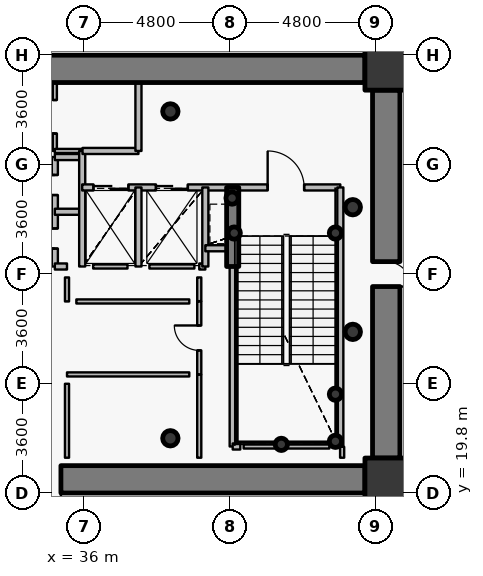
"""IFC4 building model, lengths in metres.
Left out: names, types, materials, properties, quantities, classifications, styles, units other than length and angle.
Written with IfcOpenShell. Run it as: python <this file> out.ifc"""

import sys

from ifc_helpers import new_model, si_unit, direction, frame, frame_2d, origin, origin_2d, place, context, subcontext, project, spatial, rectangle, hollow_circle, extrude, source, transform, mapped, element, fill, save


model = new_model("IFC4")
c1 = context("Model", 3, precision=1e-05, world=origin(), true_north=direction((0.0, 1.0)))
c2 = subcontext(c1, "Body", "Model", "MODEL_VIEW")
j1 = project(units=[si_unit("LENGTHUNIT", "METRE"), si_unit("PLANEANGLEUNIT", "RADIAN")], contexts=[c1])
p1 = place(None, origin())
s1 = spatial("IfcSite", under=j1, at=p1, CompositionType="ELEMENT")
p2 = place(p1, origin())
s2 = spatial("IfcBuilding", under=s1, at=p2, CompositionType="ELEMENT")
p3 = place(p2, frame((0.0, 0.0, -4.5)))
s3 = spatial("IfcBuildingStorey", under=s2, at=p3, CompositionType="ELEMENT", Elevation=-4.5)
for number, where, z_axis, x_axis in (
    (1, (45.95, 20.25, 0.0), (0.0, 0.0, 1.0), (1.0, 0.0, 0.0)),
    (2, (45.95, 33.75, 0.0), (0.0, 0.0, 1.0), (1.0, 0.0, 0.0)),
):
    element("IfcColumn", number, at=place(p3, frame(where, z_axis=z_axis, x_axis=x_axis)), inside=s3, PredefinedType="COLUMN", context=c2, shape_type="SweptSolid", body=[
        extrude(rectangle(XDim=1.4, YDim=1.4, at=origin_2d()), origin(), (0.0, 0.0, 1.0), 4.5),
    ])
for number, where, z_axis, x_axis in (
    (3, (38.85, 21.6, 0.0), (0.0, 0.0, 1.0), (1.0, 0.0, 0.0)),
    (4, (38.85, 32.35, 0.0), (0.0, 0.0, 1.0), (1.0, 0.0, 0.0)),
):
    element("IfcColumn", number, at=place(p3, frame(where, z_axis=z_axis, x_axis=x_axis)), inside=s3, PredefinedType="COLUMN", context=c2, shape_type="SweptSolid", body=[
        extrude(hollow_circle(Radius=0.254, WallThickness=0.02, at=origin_2d()), origin(), (0.0, 0.0, 1.0), 4.5),
    ])
for number, where, z_axis, x_axis in (
    (5, (44.28, 21.5, 0.0), (0.0, 0.0, 1.0), (1.0, 0.0, 0.0)),
    (6, (44.28, 23.05, 0.0), (0.0, 0.0, 1.0), (1.0, 0.0, 0.0)),
    (7, (42.5, 21.4, 0.0), (0.0, 0.0, 1.0), (1.0, 0.0, 0.0)),
    (8, (40.95, 28.35, 0.0), (0.0, 0.0, 1.0), (1.0, 0.0, 0.0)),
    (9, (44.28, 28.35, 0.0), (0.0, 0.0, 1.0), (1.0, 0.0, 0.0)),
    (10, (40.88, 29.5, 0.0), (0.0, 0.0, 1.0), (1.0, 0.0, 0.0)),
):
    element("IfcColumn", number, at=place(p3, frame(where, z_axis=z_axis, x_axis=x_axis)), inside=s3, PredefinedType="COLUMN", context=c2, shape_type="SweptSolid", body=[
        extrude(hollow_circle(Radius=0.203, WallThickness=0.016, at=origin_2d()), origin(), (0.0, 0.0, 1.0), 4.5),
    ])
p4 = place(p3, frame((26.75, 33.75, 0.0), z_axis=(0.0, 0.0, 1.0), x_axis=(1.0, 0.0, 0.0)))
e11 = element("IfcWall", 11, at=p4, inside=s3, PredefinedType="SHEAR", context=c2, shape_type="SweptSolid", body=[
    extrude(rectangle(XDim=18.5, YDim=0.9, at=frame_2d((9.25, 0.0))), origin(), (0.0, 0.0, 1.0), 3.65),
])
p5 = place(p3, frame((45.95, 33.05, 0.0), z_axis=(0.0, 0.0, 1.0), x_axis=(0.0, -1.0, 0.0)))
e12 = element("IfcWall", 12, at=p5, inside=s3, PredefinedType="SHEAR", context=c2, shape_type="SweptSolid", body=[
    extrude(rectangle(XDim=12.1, YDim=0.9, at=frame_2d((6.05, 0.0))), origin(), (0.0, 0.0, 1.0), 3.65),
])
p6 = place(p5, frame((5.64, 0.0, 0.0)))
e13 = element("IfcOpeningElement", 13, at=p6, cuts=e12, PredefinedType="OPENING", context=c2, shape_type="SweptSolid", body=[
    extrude(rectangle(XDim=0.82, YDim=2.1, at=origin_2d()), frame((0.41, 0.46, 1.05), z_axis=(0.0, -1.0, 0.0), x_axis=(1.0, 0.0, 0.0)), (0.0, 0.0, 1.0), 0.92),
])
p7 = place(p3, frame((45.25, 20.25, 0.0), z_axis=(0.0, 0.0, 1.0), x_axis=(-1.0, 0.0, 0.0)))
e14 = element("IfcWall", 14, at=p7, inside=s3, PredefinedType="SHEAR", context=c2, shape_type="SweptSolid", body=[
    extrude(rectangle(XDim=18.5, YDim=0.9, at=frame_2d((9.25, 0.0))), origin(), (0.0, 0.0, 1.0), 3.65),
])
p8 = place(p7, frame((10.0, 0.0, 0.0)))
e15 = element("IfcOpeningElement", 15, at=p8, cuts=e14, PredefinedType="OPENING", context=c2, shape_type="SweptSolid", body=[
    extrude(rectangle(XDim=1.15, YDim=2.15, at=origin_2d()), frame((0.575, 0.46, 1.075), z_axis=(0.0, -1.0, 0.0), x_axis=(1.0, 0.0, 0.0)), (0.0, 0.0, 1.0), 0.92),
])
p9 = place(p3, frame((40.9, 27.25, 0.0), z_axis=(0.0, 0.0, 1.0), x_axis=(0.0, 1.0, 0.0)))
e16 = element("IfcWall", 16, at=p9, inside=s3, PredefinedType="SHEAR", context=c2, shape_type="SweptSolid", body=[
    extrude(rectangle(XDim=2.6, YDim=0.4, at=frame_2d((1.3, 0.0))), origin(), (0.0, 0.0, 1.0), 3.8),
])
for number, where, z_axis, x_axis in (
    (17, (44.85, 25.1, 0.0), (0.0, 0.0, 1.0), (1.0, 0.0, 0.0)),
    (18, (44.85, 29.2, 0.0), (0.0, 0.0, 1.0), (1.0, 0.0, 0.0)),
):
    element("IfcColumn", number, at=place(p3, frame(where, z_axis=z_axis, x_axis=x_axis)), inside=s3, PredefinedType="COLUMN", context=c2, shape_type="SweptSolid", body=[
        extrude(hollow_circle(Radius=0.254, WallThickness=0.02, at=origin_2d()), origin(), (0.0, 0.0, 1.0), 4.5),
    ])
p10 = place(p3, frame((35.05, 27.25, 0.0), z_axis=(0.0, 0.0, 1.0), x_axis=(0.0, 1.0, 0.0)))
e19 = element("IfcWall", 19, at=p10, inside=s3, PredefinedType="PARTITIONING", context=c2, shape_type="SweptSolid", body=[
    extrude(rectangle(XDim=3.6, YDim=0.2, at=frame_2d((1.8, 0.0))), origin(), (0.0, 0.0, 1.0), 4.2),
])
p11 = place(p10, frame((0.59, 0.0, 0.0)))
e20 = element("IfcOpeningElement", 20, at=p11, cuts=e19, PredefinedType="OPENING", context=c2, shape_type="SweptSolid", body=[
    extrude(rectangle(XDim=0.66, YDim=2.05, at=origin_2d()), frame((0.33, 0.11, 1.025), z_axis=(0.0, -1.0, 0.0), x_axis=(1.0, 0.0, 0.0)), (0.0, 0.0, 1.0), 0.22),
])
p12 = place(p10, frame((2.35, 0.0, 0.0)))
e21 = element("IfcOpeningElement", 21, at=p12, cuts=e19, PredefinedType="OPENING", context=c2, shape_type="SweptSolid", body=[
    extrude(rectangle(XDim=0.66, YDim=2.05, at=origin_2d()), frame((0.33, 0.11, 1.025), z_axis=(0.0, -1.0, 0.0), x_axis=(1.0, 0.0, 0.0)), (0.0, 0.0, 1.0), 0.22),
])
p13 = place(p3, frame((35.05, 27.25, 0.0), z_axis=(0.0, 0.0, 1.0), x_axis=(1.0, 0.0, 0.0)))
e22 = element("IfcWall", 22, at=p13, inside=s3, PredefinedType="PARTITIONING", context=c2, shape_type="SweptSolid", body=[
    extrude(rectangle(XDim=0.4, YDim=0.2, at=frame_2d((0.2, 0.0))), origin(), (0.0, 0.0, 1.0), 4.2),
])
for number, where, z_axis, x_axis in (
    (23, (35.05, 29.05, 0.0), (0.0, 0.0, 1.0), (1.0, 0.0, 0.0)),
    (24, (35.05, 30.85, 0.0), (0.0, 0.0, 1.0), (1.0, 0.0, 0.0)),
):
    element("IfcWall", number, at=place(p3, frame(where, z_axis=z_axis, x_axis=x_axis)), inside=s3, PredefinedType="PARTITIONING", context=c2, shape_type="SweptSolid", body=[
        extrude(rectangle(XDim=0.9, YDim=0.2, at=frame_2d((0.45, 0.0))), origin(), (0.0, 0.0, 1.0), 4.2),
    ])
p14 = place(p3, frame((35.05, 31.05, 0.0), z_axis=(0.0, 0.0, 1.0), x_axis=(0.0, 1.0, 0.0)))
e25 = element("IfcWall", 25, at=p14, inside=s3, PredefinedType="PARTITIONING", context=c2, shape_type="SweptSolid", body=[
    extrude(rectangle(XDim=2.25, YDim=0.135, at=frame_2d((1.125, 0.0))), origin(), (0.0, 0.0, 1.0), 3.785),
])
p15 = place(p14, frame((0.575, 0.0, 0.0)))
e26 = element("IfcOpeningElement", 26, at=p15, cuts=e25, PredefinedType="OPENING", context=c2, shape_type="SweptSolid", body=[
    extrude(rectangle(XDim=1.1, YDim=2.15, at=origin_2d()), frame((0.55, 0.078, 1.075), z_axis=(0.0, -1.0, 0.0), x_axis=(1.0, 0.0, 0.0)), (0.0, 0.0, 1.0), 0.155),
])
p16 = place(p3, frame((35.05, 31.05, 0.0), z_axis=(0.0, 0.0, 1.0), x_axis=(1.0, 0.0, 0.0)))
e27 = element("IfcWall", 27, at=p16, inside=s3, PredefinedType="PARTITIONING", context=c2, shape_type="SweptSolid", body=[
    extrude(rectangle(XDim=0.9, YDim=0.135, at=frame_2d((0.45, 0.0))), origin(), (0.0, 0.0, 1.0), 4.2),
])
p17 = place(p3, frame((35.95, 27.25, 0.0), z_axis=(0.0, 0.0, 1.0), x_axis=(0.0, 1.0, 0.0)))
e28 = element("IfcWall", 28, at=p17, inside=s3, PredefinedType="PARTITIONING", context=c2, shape_type="SweptSolid", body=[
    extrude(rectangle(XDim=3.8, YDim=0.2, at=frame_2d((1.9, 0.0))), origin(), (0.0, 0.0, 1.0), 4.2),
])
p18 = place(p3, frame((35.95, 29.85, 0.0), z_axis=(0.0, 0.0, 1.0), x_axis=(1.0, 0.0, 0.0)))
e29 = element("IfcWall", 29, at=p18, inside=s3, PredefinedType="PARTITIONING", context=c2, shape_type="SweptSolid", body=[
    extrude(rectangle(XDim=8.49, YDim=0.2, at=frame_2d((4.245, 0.0))), origin(), (0.0, 0.0, 1.0), 3.785),
])
p19 = place(p18, frame((6.1, 0.0, 0.0)))
e30 = element("IfcOpeningElement", 30, at=p19, cuts=e29, PredefinedType="OPENING", context=c2, shape_type="SweptSolid", body=[
    extrude(rectangle(XDim=1.2, YDim=2.15, at=origin_2d()), frame((0.6, 0.11, 1.075), z_axis=(0.0, -1.0, 0.0), x_axis=(1.0, 0.0, 0.0)), (0.0, 0.0, 1.0), 0.22),
])
p20 = place(p18, frame((0.37, 0.0, 0.0)))
e31 = element("IfcOpeningElement", 31, at=p20, cuts=e29, PredefinedType="OPENING", context=c2, shape_type="SweptSolid", body=[
    extrude(rectangle(XDim=1.15, YDim=2.15, at=origin_2d()), frame((0.575, 0.11, 1.075), z_axis=(0.0, -1.0, 0.0), x_axis=(1.0, 0.0, 0.0)), (0.0, 0.0, 1.0), 0.22),
])
p21 = place(p18, frame((2.425, 0.0, 0.0)))
e32 = element("IfcOpeningElement", 32, at=p21, cuts=e29, PredefinedType="OPENING", context=c2, shape_type="SweptSolid", body=[
    extrude(rectangle(XDim=1.05, YDim=2.15, at=origin_2d()), frame((0.525, 0.11, 1.075), z_axis=(0.0, -1.0, 0.0), x_axis=(1.0, 0.0, 0.0)), (0.0, 0.0, 1.0), 0.22),
])
p22 = place(p3, frame((35.96, 31.05, 0.0), z_axis=(0.0, 0.0, 1.0), x_axis=(1.0, 0.0, 0.0)))
e33 = element("IfcWall", 33, at=p22, inside=s3, PredefinedType="PARTITIONING", context=c2, shape_type="SweptSolid", body=[
    extrude(rectangle(XDim=1.84, YDim=0.2, at=frame_2d((0.92, 0.0))), origin(), (0.0, 0.0, 1.0), 4.2),
])
p23 = place(p3, frame((37.8, 27.25, 0.0), z_axis=(0.0, 0.0, 1.0), x_axis=(0.0, 1.0, 0.0)))
e34 = element("IfcWall", 34, at=p23, inside=s3, PredefinedType="PARTITIONING", context=c2, shape_type="SweptSolid", body=[
    extrude(rectangle(XDim=2.6, YDim=0.2, at=frame_2d((1.3, 0.0))), origin(), (0.0, 0.0, 1.0), 4.2),
])
p24 = place(p3, frame((37.8, 31.05, 0.0), z_axis=(0.0, 0.0, 1.0), x_axis=(0.0, 1.0, 0.0)))
e35 = element("IfcWall", 35, at=p24, inside=s3, PredefinedType="PARTITIONING", context=c2, shape_type="SweptSolid", body=[
    extrude(rectangle(XDim=2.25, YDim=0.2, at=frame_2d((1.125, 0.0))), origin(), (0.0, 0.0, 1.0), 3.785),
])
p25 = place(p3, frame((39.8, 23.7, 0.0), z_axis=(0.0, 0.0, 1.0), x_axis=(0.0, 1.0, 0.0)))
e36 = element("IfcWall", 36, at=p25, inside=s3, PredefinedType="PARTITIONING", context=c2, shape_type="SweptSolid", body=[
    extrude(rectangle(XDim=2.4, YDim=0.135, at=frame_2d((1.2, 0.0))), origin(), (0.0, 0.0, 1.0), 4.2),
])
p26 = place(p25, frame((0.79, 0.0, 0.0)))
e37 = element("IfcOpeningElement", 37, at=p26, cuts=e36, PredefinedType="OPENING", context=c2, shape_type="SweptSolid", body=[
    extrude(rectangle(XDim=0.82, YDim=2.1, at=origin_2d()), frame((0.41, 0.078, 1.05), z_axis=(0.0, -1.0, 0.0), x_axis=(1.0, 0.0, 0.0)), (0.0, 0.0, 1.0), 0.155),
])
p27 = place(p3, frame((39.8, 27.25, 0.0), z_axis=(0.0, 0.0, 1.0), x_axis=(1.0, 0.0, 0.0)))
e38 = element("IfcWall", 38, at=p27, inside=s3, PredefinedType="PARTITIONING", context=c2, shape_type="SweptSolid", body=[
    extrude(rectangle(XDim=0.2, YDim=0.2, at=frame_2d((0.1, 0.0))), origin(), (0.0, 0.0, 1.0), 4.2),
])
p28 = place(p3, frame((40.0, 27.25, 0.0), z_axis=(0.0, 0.0, 1.0), x_axis=(0.0, 1.0, 0.0)))
e39 = element("IfcWall", 39, at=p28, inside=s3, PredefinedType="PARTITIONING", context=c2, shape_type="SweptSolid", body=[
    extrude(rectangle(XDim=2.6, YDim=0.2, at=frame_2d((1.3, 0.0))), origin(), (0.0, 0.0, 1.0), 4.2),
])
p29 = place(p3, frame((40.0, 27.85, 0.0), z_axis=(0.0, 0.0, 1.0), x_axis=(1.0, 0.0, 0.0)))
e40 = element("IfcWall", 40, at=p29, inside=s3, PredefinedType="PARTITIONING", context=c2, shape_type="SweptSolid", body=[
    extrude(rectangle(XDim=0.9, YDim=0.2, at=frame_2d((0.45, 0.0))), origin(), (0.0, 0.0, 1.0), 4.2),
])
p30 = place(p3, frame((40.9, 21.33, 0.0), z_axis=(0.0, 0.0, 1.0), x_axis=(0.0, 1.0, 0.0)))
e41 = element("IfcWall", 41, at=p30, inside=s3, PredefinedType="PARTITIONING", context=c2, shape_type="SweptSolid", body=[
    extrude(rectangle(XDim=5.91, YDim=0.2, at=frame_2d((2.955, 0.0))), origin(), (0.0, 0.0, 1.0), 3.735),
])
p31 = place(p3, frame((40.9, 21.33, 0.0), z_axis=(0.0, 0.0, 1.0), x_axis=(1.0, 0.0, 0.0)))
e42 = element("IfcWall", 42, at=p31, inside=s3, PredefinedType="PARTITIONING", context=c2, shape_type="SweptSolid", body=[
    extrude(rectangle(XDim=0.25, YDim=0.2, at=frame_2d((0.125, 0.0))), origin(), (0.0, 0.0, 1.0), 3.735),
])
p32 = place(p3, frame((44.44, 21.33, 0.0), z_axis=(0.0, 0.0, 1.0), x_axis=(0.0, 1.0, 0.0)))
e43 = element("IfcWall", 43, at=p32, inside=s3, PredefinedType="PARTITIONING", context=c2, shape_type="SweptSolid", body=[
    extrude(rectangle(XDim=8.52, YDim=0.2, at=frame_2d((4.26, 0.0))), origin(), (0.0, 0.0, 1.0), 4.2),
])
p33 = place(p3, frame((44.08, 21.33, 0.0), z_axis=(0.0, 0.0, 1.0), x_axis=(-1.0, 0.0, 0.0)))
e44 = element("IfcWall", 44, at=p33, inside=s3, PredefinedType="PARTITIONING", context=c2, shape_type="SweptSolid", body=[
    extrude(rectangle(XDim=2.82, YDim=0.135, at=frame_2d((1.41, 0.0))), origin(), (0.0, 0.0, 1.0), 3.735),
])
p34 = place(p3, frame((37.44, 27.25, 0.0), z_axis=(0.0, 0.0, 1.0), x_axis=(-1.0, 0.0, 0.0)))
e45 = element("IfcWall", 45, at=p34, inside=s3, PredefinedType="PARTITIONING", context=c2, shape_type="SweptSolid", body=[
    extrude(rectangle(XDim=1.13, YDim=0.135, at=frame_2d((0.565, 0.0))), origin(), (0.0, 0.0, 1.0), 4.2),
])
p35 = place(p3, frame((39.64, 27.25, 0.0), z_axis=(0.0, 0.0, 1.0), x_axis=(-1.0, 0.0, 0.0)))
e46 = element("IfcWall", 46, at=p35, inside=s3, PredefinedType="PARTITIONING", context=c2, shape_type="SweptSolid", body=[
    extrude(rectangle(XDim=1.48, YDim=0.135, at=frame_2d((0.74, 0.0))), origin(), (0.0, 0.0, 1.0), 3.785),
])
p36 = place(p3, frame((39.8, 20.96, 0.0), z_axis=(0.0, 0.0, 1.0), x_axis=(0.0, 1.0, 0.0)))
e47 = element("IfcWall", 47, at=p36, inside=s3, PredefinedType="PARTITIONING", context=c2, shape_type="SweptSolid", body=[
    extrude(rectangle(XDim=2.73, YDim=0.135, at=frame_2d((1.365, 0.0))), origin(), (0.0, 0.0, 1.0), 3.735),
])
p37 = place(p3, frame((39.8, 26.11, 0.0), z_axis=(0.0, 0.0, 1.0), x_axis=(0.0, 1.0, 0.0)))
e48 = element("IfcWall", 48, at=p37, inside=s3, PredefinedType="PARTITIONING", context=c2, shape_type="SweptSolid", body=[
    extrude(rectangle(XDim=0.78, YDim=0.135, at=frame_2d((0.39, 0.0))), origin(), (0.0, 0.0, 1.0), 4.2),
])
p38 = place(p3, frame((44.5, 20.96, 0.0), z_axis=(0.0, 0.0, 1.0), x_axis=(0.0, 1.0, 0.0)))
e49 = element("IfcWall", 49, at=p38, inside=s3, PredefinedType="PARTITIONING", context=c2, shape_type="SweptSolid", body=[
    extrude(rectangle(XDim=0.36, YDim=0.135, at=frame_2d((0.18, 0.0))), origin(), (0.0, 0.0, 1.0), 4.2),
])
p39 = place(p3, frame((35.45, 26.89, 0.0), z_axis=(0.0, 0.0, 1.0), x_axis=(0.0, -1.0, 0.0)))
e50 = element("IfcWall", 50, at=p39, inside=s3, PredefinedType="PARTITIONING", context=c2, shape_type="SweptSolid", body=[
    extrude(rectangle(XDim=0.79, YDim=0.135, at=frame_2d((0.395, 0.0))), origin(), (0.0, 0.0, 1.0), 4.2),
])
p40 = place(p3, frame((35.758, 26.1, 0.0), z_axis=(0.0, 0.0, 1.0), x_axis=(1.0, 0.0, 0.0)))
e51 = element("IfcWall", 51, at=p40, inside=s3, PredefinedType="PARTITIONING", context=c2, shape_type="SweptSolid", body=[
    extrude(rectangle(XDim=3.715, YDim=0.135, at=frame_2d((1.857, 0.0))), origin(), (0.0, 0.0, 1.0), 3.785),
])
p41 = place(p3, frame((39.472, 23.7, 0.0), z_axis=(0.0, 0.0, 1.0), x_axis=(-1.0, 0.0, 0.0)))
e52 = element("IfcWall", 52, at=p41, inside=s3, PredefinedType="PARTITIONING", context=c2, shape_type="SweptSolid", body=[
    extrude(rectangle(XDim=4.022, YDim=0.135, at=frame_2d((2.011, 0.0))), origin(), (0.0, 0.0, 1.0), 3.785),
])
p42 = place(p3, frame((35.45, 23.393, 0.0), z_axis=(0.0, 0.0, 1.0), x_axis=(0.0, -1.0, 0.0)))
e53 = element("IfcWall", 53, at=p42, inside=s3, PredefinedType="PARTITIONING", context=c2, shape_type="SweptSolid", body=[
    extrude(rectangle(XDim=2.433, YDim=0.135, at=frame_2d((1.216, 0.0))), origin(), (0.0, 0.0, 1.0), 3.785),
])
m1 = source(origin(), c2, "Body", "SweptSolid", [
    extrude(rectangle(XDim=0.82, YDim=2.1, at=origin_2d()), frame((0.41, 0.025, 1.05), z_axis=(0.0, -1.0, 0.0), x_axis=(1.0, 0.0, 0.0)), (0.0, 0.0, 1.0), 0.05),
])
p43 = place(p6, origin())
e54 = element("IfcDoor", 54, at=p43, inside=s3, OperationType="SINGLE_SWING_RIGHT", PredefinedType="DOOR", context=c2, shape_type="MappedRepresentation", body=[
    mapped(m1, transform((0.0, 0.0, 0.0), x_axis=(1.0, 0.0, 0.0), y_axis=(0.0, 1.0, 0.0), z_axis=(0.0, 0.0, 1.0), scale=1.0)),
])
fill(e13, e54)
m2 = source(origin(), c2, "Body", "SweptSolid", [
    extrude(rectangle(XDim=1.15, YDim=2.15, at=origin_2d()), frame((0.575, 0.025, 1.075), z_axis=(0.0, -1.0, 0.0), x_axis=(1.0, 0.0, 0.0)), (0.0, 0.0, 1.0), 0.05),
])
p44 = place(p8, origin())
e55 = element("IfcDoor", 55, at=p44, inside=s3, OperationType="SINGLE_SWING_LEFT", PredefinedType="DOOR", context=c2, shape_type="MappedRepresentation", body=[
    mapped(m2, transform((0.0, 0.0, 0.0), x_axis=(1.0, 0.0, 0.0), y_axis=(0.0, 1.0, 0.0), z_axis=(0.0, 0.0, 1.0), scale=1.0)),
])
fill(e15, e55)
m3 = source(origin(), c2, "Body", "SweptSolid", [
    extrude(rectangle(XDim=1.2, YDim=2.15, at=origin_2d()), frame((0.6, 0.025, 1.075), z_axis=(0.0, -1.0, 0.0), x_axis=(1.0, 0.0, 0.0)), (0.0, 0.0, 1.0), 0.05),
])
p45 = place(p19, origin())
e56 = element("IfcDoor", 56, at=p45, inside=s3, OperationType="SINGLE_SWING_LEFT", PredefinedType="DOOR", context=c2, shape_type="MappedRepresentation", body=[
    mapped(m3, transform((0.0, 0.0, 0.0), x_axis=(1.0, 0.0, 0.0), y_axis=(0.0, 1.0, 0.0), z_axis=(0.0, 0.0, 1.0), scale=1.0)),
])
fill(e30, e56)
m4 = source(origin(), c2, "Body", "SweptSolid", [
    extrude(rectangle(XDim=1.15, YDim=2.15, at=origin_2d()), frame((0.575, 0.025, 1.075), z_axis=(0.0, -1.0, 0.0), x_axis=(1.0, 0.0, 0.0)), (0.0, 0.0, 1.0), 0.05),
])
p46 = place(p20, origin())
e57 = element("IfcDoor", 57, at=p46, inside=s3, OperationType="DOUBLE_DOOR_SLIDING", PredefinedType="USERDEFINED", context=c2, shape_type="MappedRepresentation", body=[
    mapped(m4, transform((0.0, 0.0, 0.0), x_axis=(1.0, 0.0, 0.0), y_axis=(0.0, 1.0, 0.0), z_axis=(0.0, 0.0, 1.0), scale=1.0)),
])
fill(e31, e57)
m5 = source(origin(), c2, "Body", "SweptSolid", [
    extrude(rectangle(XDim=1.05, YDim=2.15, at=origin_2d()), frame((0.525, 0.025, 1.075), z_axis=(0.0, -1.0, 0.0), x_axis=(1.0, 0.0, 0.0)), (0.0, 0.0, 1.0), 0.05),
])
p47 = place(p21, origin())
e58 = element("IfcDoor", 58, at=p47, inside=s3, OperationType="DOUBLE_DOOR_SLIDING", PredefinedType="USERDEFINED", context=c2, shape_type="MappedRepresentation", body=[
    mapped(m5, transform((0.0, 0.0, 0.0), x_axis=(1.0, 0.0, 0.0), y_axis=(0.0, 1.0, 0.0), z_axis=(0.0, 0.0, 1.0), scale=1.0)),
])
fill(e32, e58)
m6 = source(origin(), c2, "Body", "SweptSolid", [
    extrude(rectangle(XDim=0.66, YDim=2.05, at=origin_2d()), frame((0.33, 0.025, 1.025), z_axis=(0.0, -1.0, 0.0), x_axis=(1.0, 0.0, 0.0)), (0.0, 0.0, 1.0), 0.05),
])
p48 = place(p11, origin())
e59 = element("IfcDoor", 59, at=p48, inside=s3, OperationType="SINGLE_SWING_LEFT", PredefinedType="USERDEFINED", context=c2, shape_type="MappedRepresentation", body=[
    mapped(m6, transform((0.0, 0.0, 0.0), x_axis=(1.0, 0.0, 0.0), y_axis=(0.0, 1.0, 0.0), z_axis=(0.0, 0.0, 1.0), scale=1.0)),
])
fill(e20, e59)
p49 = place(p12, origin())
e60 = element("IfcDoor", 60, at=p49, inside=s3, OperationType="SINGLE_SWING_RIGHT", PredefinedType="USERDEFINED", context=c2, shape_type="MappedRepresentation", body=[
    mapped(m6, transform((0.0, 0.0, 0.0), x_axis=(1.0, 0.0, 0.0), y_axis=(0.0, 1.0, 0.0), z_axis=(0.0, 0.0, 1.0), scale=1.0)),
])
fill(e21, e60)
m7 = source(origin(), c2, "Body", "SweptSolid", [
    extrude(rectangle(XDim=1.1, YDim=2.15, at=origin_2d()), frame((0.55, 0.025, 1.075), z_axis=(0.0, -1.0, 0.0), x_axis=(1.0, 0.0, 0.0)), (0.0, 0.0, 1.0), 0.05),
])
p50 = place(p15, origin())
e61 = element("IfcDoor", 61, at=p50, inside=s3, OperationType="SINGLE_SWING_LEFT", PredefinedType="DOOR", context=c2, shape_type="MappedRepresentation", body=[
    mapped(m7, transform((0.0, 0.0, 0.0), x_axis=(1.0, 0.0, 0.0), y_axis=(0.0, 1.0, 0.0), z_axis=(0.0, 0.0, 1.0), scale=1.0)),
])
fill(e26, e61)
p51 = place(p26, origin())
e62 = element("IfcDoor", 62, at=p51, inside=s3, OperationType="SINGLE_SWING_RIGHT", PredefinedType="DOOR", context=c2, shape_type="MappedRepresentation", body=[
    mapped(m1, transform((0.0, 0.0, 0.0), x_axis=(1.0, 0.0, 0.0), y_axis=(0.0, 1.0, 0.0), z_axis=(0.0, 0.0, 1.0), scale=1.0)),
])
fill(e37, e62)
save(model, sys.argv[1])
